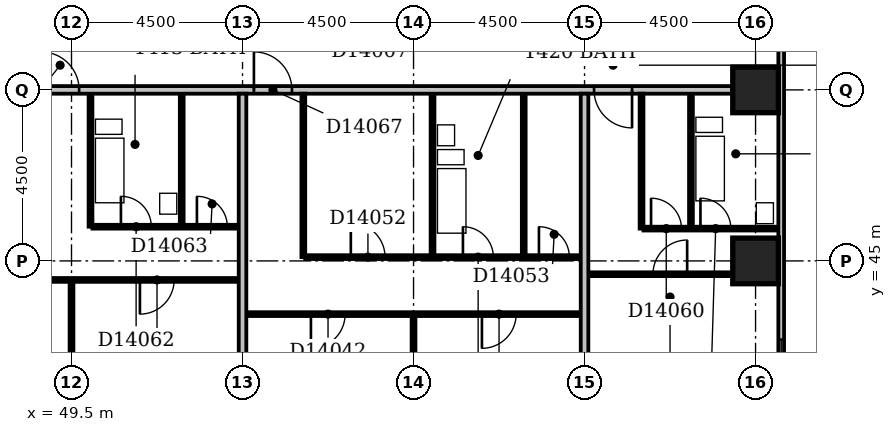
"""IFC4 building model, lengths in metres.
Left out: names, types, materials, properties, quantities, classifications, styles, units other than length and angle.
Written with IfcOpenShell. Run it as: python <this file> out.ifc"""

import sys

from ifc_helpers import new_model, si_unit, direction, frame, frame_2d, origin, origin_2d, place, context, subcontext, project, spatial, rectangle, extrude, element, fill, save


model = new_model("IFC4")
c1 = context("Model", 3, precision=1e-05, world=origin(), true_north=direction((0.0, 1.0)))
c2 = subcontext(c1, "Body", "Model", "MODEL_VIEW")
j1 = project(units=[si_unit("LENGTHUNIT", "METRE"), si_unit("PLANEANGLEUNIT", "RADIAN")], contexts=[c1])
p1 = place(None, origin())
s1 = spatial("IfcSite", under=j1, at=p1, CompositionType="ELEMENT")
p2 = place(p1, origin())
s2 = spatial("IfcBuilding", under=s1, at=p2, CompositionType="ELEMENT")
p3 = place(p2, frame((0.0, 0.0, 61.4)))
s3 = spatial("IfcBuildingStorey", under=s2, at=p3, CompositionType="ELEMENT", Elevation=61.4)
for number, where, z_axis, x_axis in (
    (1, (67.5, 45.0, -0.3), (0.0, 0.0, 1.0), (1.0, 0.0, 0.0)),
    (2, (67.5, 49.5, -0.3), (0.0, 0.0, 1.0), (1.0, 0.0, 0.0)),
):
    element("IfcColumn", number, at=place(p3, frame(where, z_axis=z_axis, x_axis=x_axis)), inside=s3, PredefinedType="COLUMN", context=c2, shape_type="SweptSolid", body=[
        extrude(rectangle(XDim=1.2, YDim=1.2, at=origin_2d()), origin(), (0.0, 0.0, 1.0), 3.6),
    ])
p4 = place(p3, frame((68.175, 35.4, 0.0), z_axis=(0.0, 0.0, 1.0), x_axis=(0.0, 1.0, 0.0)))
e3 = element("IfcWall", 3, at=p4, inside=s3, PredefinedType="STANDARD", context=c2, shape_type="SweptSolid", body=[
    extrude(rectangle(XDim=23.85, YDim=0.15, at=frame_2d((11.925, 0.0))), origin(), (0.0, 0.0, 1.0), 2.7),
])
p5 = place(p4, frame((1.65, 0.0, 0.6)))
e4 = element("IfcOpeningElement", 4, at=p5, cuts=e3, PredefinedType="OPENING", context=c2, shape_type="SweptSolid", body=[
    extrude(rectangle(XDim=2.4, YDim=1.8, at=frame_2d((1.2, 0.9))), frame((0.0, 0.087, 0.0), z_axis=(0.0, -1.0, 0.0), x_axis=(1.0, 0.0, 0.0)), (0.0, 0.0, 1.0), 0.174),
])
p6 = place(p4, frame((6.03, 0.0, 0.6)))
e5 = element("IfcOpeningElement", 5, at=p6, cuts=e3, PredefinedType="OPENING", context=c2, shape_type="SweptSolid", body=[
    extrude(rectangle(XDim=1.5, YDim=1.8, at=frame_2d((0.75, 0.9))), frame((0.0, 0.087, 0.0), z_axis=(0.0, -1.0, 0.0), x_axis=(1.0, 0.0, 0.0)), (0.0, 0.0, 1.0), 0.174),
])
p7 = place(p3, frame((49.5, 36.6, 0.0), z_axis=(0.0, 0.0, 1.0), x_axis=(0.0, 1.0, 0.0)))
e6 = element("IfcWall", 6, at=p7, inside=s3, PredefinedType="PARTITIONING", context=c2, shape_type="SweptSolid", body=[
    extrude(rectangle(XDim=7.85, YDim=0.1, at=frame_2d((3.925, 0.0))), origin(), (0.0, 0.0, 1.0), 3.3),
])
p8 = place(p3, frame((54.0, 36.6, 0.0), z_axis=(0.0, 0.0, 1.0), x_axis=(0.0, 1.0, 0.0)))
e7 = element("IfcWall", 7, at=p8, inside=s3, PredefinedType="PARTITIONING", context=c2, shape_type="SweptSolid", body=[
    extrude(rectangle(XDim=12.8, YDim=0.2, at=frame_2d((6.4, 0.0))), origin(), (0.0, 0.0, 1.0), 2.6),
])
p9 = place(p3, frame((58.5, 36.6, 0.0), z_axis=(0.0, 0.0, 1.0), x_axis=(0.0, 1.0, 0.0)))
e8 = element("IfcWall", 8, at=p9, inside=s3, PredefinedType="PARTITIONING", context=c2, shape_type="SweptSolid", body=[
    extrude(rectangle(XDim=6.95, YDim=0.1, at=frame_2d((3.475, 0.0))), origin(), (0.0, 0.0, 1.0), 3.3),
])
p10 = place(p3, frame((63.0, 36.6, 0.0), z_axis=(0.0, 0.0, 1.0), x_axis=(0.0, 1.0, 0.0)))
e9 = element("IfcWall", 9, at=p10, inside=s3, PredefinedType="PARTITIONING", context=c2, shape_type="SweptSolid", body=[
    extrude(rectangle(XDim=12.8, YDim=0.2, at=frame_2d((6.4, 0.0))), origin(), (0.0, 0.0, 1.0), 2.4),
])
p11 = place(p3, frame((54.1, 43.6, 0.0), z_axis=(0.0, 0.0, 1.0), x_axis=(1.0, 0.0, 0.0)))
e10 = element("IfcWall", 10, at=p11, inside=s3, PredefinedType="PARTITIONING", context=c2, shape_type="SweptSolid", body=[
    extrude(rectangle(XDim=8.8, YDim=0.1, at=frame_2d((4.4, 0.0))), origin(), (0.0, 0.0, 1.0), 3.3),
])
p12 = place(p11, frame((1.7, 0.0, 0.0)))
e11 = element("IfcOpeningElement", 11, at=p12, cuts=e10, PredefinedType="OPENING", context=c2, shape_type="SweptSolid", body=[
    extrude(rectangle(XDim=0.9, YDim=2.1, at=frame_2d((0.45, 1.05))), frame((0.0, 0.062, 0.0), z_axis=(0.0, -1.0, 0.0), x_axis=(1.0, 0.0, 0.0)), (0.0, 0.0, 1.0), 0.124),
])
p13 = place(p11, frame((6.2, 0.0, 0.0)))
e12 = element("IfcOpeningElement", 12, at=p13, cuts=e10, PredefinedType="OPENING", context=c2, shape_type="SweptSolid", body=[
    extrude(rectangle(XDim=0.9, YDim=2.1, at=frame_2d((0.45, 1.05))), frame((0.0, 0.062, 0.0), z_axis=(0.0, -1.0, 0.0), x_axis=(1.0, 0.0, 0.0)), (0.0, 0.0, 1.0), 0.124),
])
p14 = place(p3, frame((40.6, 44.5, 0.0), z_axis=(0.0, 0.0, 1.0), x_axis=(1.0, 0.0, 0.0)))
e13 = element("IfcWall", 13, at=p14, inside=s3, PredefinedType="PARTITIONING", context=c2, shape_type="SweptSolid", body=[
    extrude(rectangle(XDim=13.3, YDim=0.1, at=frame_2d((6.65, 0.0))), origin(), (0.0, 0.0, 1.0), 3.3),
])
p15 = place(p14, frame((1.7, 0.0, 0.0)))
e14 = element("IfcOpeningElement", 14, at=p15, cuts=e13, PredefinedType="OPENING", context=c2, shape_type="SweptSolid", body=[
    extrude(rectangle(XDim=0.9, YDim=2.1, at=frame_2d((0.45, 1.05))), frame((0.0, 0.062, 0.0), z_axis=(0.0, -1.0, 0.0), x_axis=(1.0, 0.0, 0.0)), (0.0, 0.0, 1.0), 0.124),
])
p16 = place(p14, frame((6.2, 0.0, 0.0)))
e15 = element("IfcOpeningElement", 15, at=p16, cuts=e13, PredefinedType="OPENING", context=c2, shape_type="SweptSolid", body=[
    extrude(rectangle(XDim=0.9, YDim=2.1, at=frame_2d((0.45, 1.05))), frame((0.0, 0.062, 0.0), z_axis=(0.0, -1.0, 0.0), x_axis=(1.0, 0.0, 0.0)), (0.0, 0.0, 1.0), 0.124),
])
p17 = place(p14, frame((10.7, 0.0, 0.0)))
e16 = element("IfcOpeningElement", 16, at=p17, cuts=e13, PredefinedType="OPENING", context=c2, shape_type="SweptSolid", body=[
    extrude(rectangle(XDim=0.9, YDim=2.1, at=frame_2d((0.45, 1.05))), frame((0.0, 0.062, 0.0), z_axis=(0.0, -1.0, 0.0), x_axis=(1.0, 0.0, 0.0)), (0.0, 0.0, 1.0), 0.124),
])
p18 = place(p3, frame((63.1, 44.65, 0.0), z_axis=(0.0, 0.0, 1.0), x_axis=(1.0, 0.0, 0.0)))
e17 = element("IfcWall", 17, at=p18, inside=s3, PredefinedType="PARTITIONING", context=c2, shape_type="SweptSolid", body=[
    extrude(rectangle(XDim=3.8, YDim=0.1, at=frame_2d((1.9, 0.0))), origin(), (0.0, 0.0, 1.0), 3.3),
])
p19 = place(p18, frame((1.7, 0.0, 0.0)))
e18 = element("IfcOpeningElement", 18, at=p19, cuts=e17, PredefinedType="OPENING", context=c2, shape_type="SweptSolid", body=[
    extrude(rectangle(XDim=0.9, YDim=2.1, at=frame_2d((0.45, 1.05))), frame((0.0, 0.062, 0.0), z_axis=(0.0, -1.0, 0.0), x_axis=(1.0, 0.0, 0.0)), (0.0, 0.0, 1.0), 0.124),
])
p20 = place(p3, frame((55.6, 45.1, 0.0), z_axis=(0.0, 0.0, 1.0), x_axis=(0.0, 1.0, 0.0)))
e19 = element("IfcWall", 19, at=p20, inside=s3, PredefinedType="PARTITIONING", context=c2, shape_type="SweptSolid", body=[
    extrude(rectangle(XDim=4.3, YDim=0.1, at=frame_2d((2.15, 0.0))), origin(), (0.0, 0.0, 1.0), 3.3),
])
p21 = place(p3, frame((55.65, 45.1, 0.0), z_axis=(0.0, 0.0, 1.0), x_axis=(1.0, 0.0, 0.0)))
e20 = element("IfcWall", 20, at=p21, inside=s3, PredefinedType="PARTITIONING", context=c2, shape_type="SweptSolid", body=[
    extrude(rectangle(XDim=7.25, YDim=0.1, at=frame_2d((3.625, 0.0))), origin(), (0.0, 0.0, 1.0), 3.3),
])
p22 = place(p21, frame((4.15, 0.0, 0.0)))
e21 = element("IfcOpeningElement", 21, at=p22, cuts=e20, PredefinedType="OPENING", context=c2, shape_type="SweptSolid", body=[
    extrude(rectangle(XDim=0.8, YDim=2.1, at=frame_2d((0.4, 1.05))), frame((0.0, 0.062, 0.0), z_axis=(0.0, -1.0, 0.0), x_axis=(1.0, 0.0, 0.0)), (0.0, 0.0, 1.0), 0.124),
])
p23 = place(p21, frame((1.2, 0.0, 0.0)))
e22 = element("IfcOpeningElement", 22, at=p23, cuts=e20, PredefinedType="OPENING", context=c2, shape_type="SweptSolid", body=[
    extrude(rectangle(XDim=0.9, YDim=2.1, at=frame_2d((0.45, 1.05))), frame((0.0, 0.062, 0.0), z_axis=(0.0, -1.0, 0.0), x_axis=(1.0, 0.0, 0.0)), (0.0, 0.0, 1.0), 0.124),
])
p24 = place(p21, frame((6.15, 0.0, 0.0)))
e23 = element("IfcOpeningElement", 23, at=p24, cuts=e20, PredefinedType="OPENING", context=c2, shape_type="SweptSolid", body=[
    extrude(rectangle(XDim=0.8, YDim=2.1, at=frame_2d((0.4, 1.05))), frame((0.0, 0.062, 0.0), z_axis=(0.0, -1.0, 0.0), x_axis=(1.0, 0.0, 0.0)), (0.0, 0.0, 1.0), 0.124),
])
for number, where, z_axis, x_axis in (
    (24, (59.0, 45.15, 0.0), (0.0, 0.0, 1.0), (0.0, 1.0, 0.0)),
    (25, (61.4, 45.15, 0.0), (0.0, 0.0, 1.0), (0.0, 1.0, 0.0)),
):
    element("IfcWall", number, at=place(p3, frame(where, z_axis=z_axis, x_axis=x_axis)), inside=s3, PredefinedType="PLUMBINGWALL", context=c2, shape_type="SweptSolid", body=[
        extrude(rectangle(XDim=4.25, YDim=0.1, at=frame_2d((2.125, 0.0))), origin(), (0.0, 0.0, 1.0), 3.3),
    ])
p25 = place(p3, frame((64.5, 45.85, 0.0), z_axis=(0.0, 0.0, 1.0), x_axis=(0.0, 1.0, 0.0)))
e26 = element("IfcWall", 26, at=p25, inside=s3, PredefinedType="PARTITIONING", context=c2, shape_type="SweptSolid", body=[
    extrude(rectangle(XDim=3.55, YDim=0.1, at=frame_2d((1.775, 0.0))), origin(), (0.0, 0.0, 1.0), 3.3),
])
p26 = place(p3, frame((64.55, 45.85, 0.0), z_axis=(0.0, 0.0, 1.0), x_axis=(1.0, 0.0, 0.0)))
e27 = element("IfcWall", 27, at=p26, inside=s3, PredefinedType="PARTITIONING", context=c2, shape_type="SweptSolid", body=[
    extrude(rectangle(XDim=3.55, YDim=0.1, at=frame_2d((1.775, 0.0))), origin(), (0.0, 0.0, 1.0), 3.3),
])
p27 = place(p26, frame((1.5, 0.0, 0.0)))
e28 = element("IfcOpeningElement", 28, at=p27, cuts=e27, PredefinedType="OPENING", context=c2, shape_type="SweptSolid", body=[
    extrude(rectangle(XDim=0.8, YDim=2.1, at=frame_2d((0.4, 1.05))), frame((0.0, 0.062, 0.0), z_axis=(0.0, -1.0, 0.0), x_axis=(1.0, 0.0, 0.0)), (0.0, 0.0, 1.0), 0.124),
])
p28 = place(p26, frame((0.2, 0.0, 0.0)))
e29 = element("IfcOpeningElement", 29, at=p28, cuts=e27, PredefinedType="OPENING", context=c2, shape_type="SweptSolid", body=[
    extrude(rectangle(XDim=0.8, YDim=2.1, at=frame_2d((0.4, 1.05))), frame((0.0, 0.062, 0.0), z_axis=(0.0, -1.0, 0.0), x_axis=(1.0, 0.0, 0.0)), (0.0, 0.0, 1.0), 0.124),
])
p29 = place(p3, frame((50.0, 45.9, 0.0), z_axis=(0.0, 0.0, 1.0), x_axis=(0.0, 1.0, 0.0)))
e30 = element("IfcWall", 30, at=p29, inside=s3, PredefinedType="PLUMBINGWALL", context=c2, shape_type="SweptSolid", body=[
    extrude(rectangle(XDim=3.5, YDim=0.1, at=frame_2d((1.75, 0.0))), origin(), (0.0, 0.0, 1.0), 3.3),
])
p30 = place(p3, frame((50.05, 45.9, 0.0), z_axis=(0.0, 0.0, 1.0), x_axis=(1.0, 0.0, 0.0)))
e31 = element("IfcWall", 31, at=p30, inside=s3, PredefinedType="PARTITIONING", context=c2, shape_type="SweptSolid", body=[
    extrude(rectangle(XDim=3.85, YDim=0.1, at=frame_2d((1.925, 0.0))), origin(), (0.0, 0.0, 1.0), 3.3),
])
p31 = place(p30, frame((0.75, 0.0, 0.0)))
e32 = element("IfcOpeningElement", 32, at=p31, cuts=e31, PredefinedType="OPENING", context=c2, shape_type="SweptSolid", body=[
    extrude(rectangle(XDim=0.8, YDim=2.1, at=frame_2d((0.4, 1.05))), frame((0.0, 0.062, 0.0), z_axis=(0.0, -1.0, 0.0), x_axis=(1.0, 0.0, 0.0)), (0.0, 0.0, 1.0), 0.124),
])
p32 = place(p30, frame((2.75, 0.0, 0.0)))
e33 = element("IfcOpeningElement", 33, at=p32, cuts=e31, PredefinedType="OPENING", context=c2, shape_type="SweptSolid", body=[
    extrude(rectangle(XDim=0.8, YDim=2.1, at=frame_2d((0.4, 1.05))), frame((0.0, 0.062, 0.0), z_axis=(0.0, -1.0, 0.0), x_axis=(1.0, 0.0, 0.0)), (0.0, 0.0, 1.0), 0.124),
])
p33 = place(p3, frame((65.8, 45.9, 0.0), z_axis=(0.0, 0.0, 1.0), x_axis=(0.0, 1.0, 0.0)))
e34 = element("IfcWall", 34, at=p33, inside=s3, PredefinedType="PLUMBINGWALL", context=c2, shape_type="SweptSolid", body=[
    extrude(rectangle(XDim=3.5, YDim=0.1, at=frame_2d((1.75, 0.0))), origin(), (0.0, 0.0, 1.0), 3.3),
])
p34 = place(p3, frame((52.4, 45.95, 0.0), z_axis=(0.0, 0.0, 1.0), x_axis=(0.0, 1.0, 0.0)))
e35 = element("IfcWall", 35, at=p34, inside=s3, PredefinedType="PLUMBINGWALL", context=c2, shape_type="SweptSolid", body=[
    extrude(rectangle(XDim=3.45, YDim=0.1, at=frame_2d((1.725, 0.0))), origin(), (0.0, 0.0, 1.0), 3.3),
])
p35 = place(p3, frame((9.1, 49.5, 0.0), z_axis=(0.0, 0.0, 1.0), x_axis=(1.0, 0.0, 0.0)))
e36 = element("IfcWall", 36, at=p35, inside=s3, PredefinedType="PARTITIONING", context=c2, shape_type="SweptSolid", body=[
    extrude(rectangle(XDim=57.8, YDim=0.2, at=frame_2d((28.9, 0.0))), origin(), (0.0, 0.0, 1.0), 3.3),
])
p36 = place(p35, frame((15.35, 0.0, 0.0)))
e37 = element("IfcOpeningElement", 37, at=p36, cuts=e36, PredefinedType="OPENING", context=c2, shape_type="SweptSolid", body=[
    extrude(rectangle(XDim=1.0, YDim=2.1, at=frame_2d((0.5, 1.05))), frame((0.0, 0.112, 0.0), z_axis=(0.0, -1.0, 0.0), x_axis=(1.0, 0.0, 0.0)), (0.0, 0.0, 1.0), 0.224),
])
p37 = place(p35, frame((18.2, 0.0, 0.0)))
e38 = element("IfcOpeningElement", 38, at=p37, cuts=e36, PredefinedType="OPENING", context=c2, shape_type="SweptSolid", body=[
    extrude(rectangle(XDim=1.0, YDim=2.1, at=frame_2d((0.5, 1.05))), frame((0.0, 0.112, 0.0), z_axis=(0.0, -1.0, 0.0), x_axis=(1.0, 0.0, 0.0)), (0.0, 0.0, 1.0), 0.224),
])
p38 = place(p35, frame((39.6, 0.0, 0.0)))
e39 = element("IfcOpeningElement", 39, at=p38, cuts=e36, PredefinedType="OPENING", context=c2, shape_type="SweptSolid", body=[
    extrude(rectangle(XDim=1.0, YDim=2.1, at=frame_2d((0.5, 1.05))), frame((0.0, 0.112, 0.0), z_axis=(0.0, -1.0, 0.0), x_axis=(1.0, 0.0, 0.0)), (0.0, 0.0, 1.0), 0.224),
])
p39 = place(p35, frame((45.2, 0.0, 0.0)))
e40 = element("IfcOpeningElement", 40, at=p39, cuts=e36, PredefinedType="OPENING", context=c2, shape_type="SweptSolid", body=[
    extrude(rectangle(XDim=1.0, YDim=2.1, at=frame_2d((0.5, 1.05))), frame((0.0, 0.112, 0.0), z_axis=(0.0, -1.0, 0.0), x_axis=(1.0, 0.0, 0.0)), (0.0, 0.0, 1.0), 0.224),
])
p40 = place(p35, frame((54.15, 0.0, 0.0)))
e41 = element("IfcOpeningElement", 41, at=p40, cuts=e36, PredefinedType="OPENING", context=c2, shape_type="SweptSolid", body=[
    extrude(rectangle(XDim=1.0, YDim=2.1, at=frame_2d((0.5, 1.05))), frame((0.0, 0.112, 0.0), z_axis=(0.0, -1.0, 0.0), x_axis=(1.0, 0.0, 0.0)), (0.0, 0.0, 1.0), 0.224),
])
p41 = place(p35, frame((6.15, 0.0, 0.0)))
e42 = element("IfcOpeningElement", 42, at=p41, cuts=e36, PredefinedType="OPENING", context=c2, shape_type="SweptSolid", body=[
    extrude(rectangle(XDim=0.9, YDim=2.1, at=frame_2d((0.45, 1.05))), frame((0.0, 0.112, 0.0), z_axis=(0.0, -1.0, 0.0), x_axis=(1.0, 0.0, 0.0)), (0.0, 0.0, 1.0), 0.224),
])
p42 = place(p6, origin())
e43 = element("IfcWindow", 43, at=p42, inside=s3, PartitioningType="SINGLE_PANEL", PredefinedType="WINDOW", context=c2, shape_type="SweptSolid", body=[
    extrude(rectangle(XDim=1.5, YDim=1.8, at=frame_2d((0.75, 0.9))), frame((0.0, 0.03, 0.0), z_axis=(0.0, -1.0, 0.0), x_axis=(1.0, 0.0, 0.0)), (0.0, 0.0, 1.0), 0.06),
])
fill(e5, e43)
p43 = place(p12, frame((0.9, 0.0, 0.0), z_axis=(0.0, 0.0, 1.0), x_axis=(-1.0, 0.0, 0.0)))
e44 = element("IfcDoor", 44, at=p43, inside=s3, OperationType="SINGLE_SWING_RIGHT", PredefinedType="DOOR", context=c2, shape_type="SweptSolid", body=[
    extrude(rectangle(XDim=0.9, YDim=2.1, at=frame_2d((0.45, 1.05))), frame((0.0, 0.025, 0.0), z_axis=(0.0, -1.0, 0.0), x_axis=(1.0, 0.0, 0.0)), (0.0, 0.0, 1.0), 0.05),
])
fill(e11, e44)
p44 = place(p13, frame((0.9, 0.0, 0.0), z_axis=(0.0, 0.0, 1.0), x_axis=(-1.0, 0.0, 0.0)))
e45 = element("IfcDoor", 45, at=p44, inside=s3, OperationType="SINGLE_SWING_RIGHT", PredefinedType="DOOR", context=c2, shape_type="SweptSolid", body=[
    extrude(rectangle(XDim=0.9, YDim=2.1, at=frame_2d((0.45, 1.05))), frame((0.0, 0.025, 0.0), z_axis=(0.0, -1.0, 0.0), x_axis=(1.0, 0.0, 0.0)), (0.0, 0.0, 1.0), 0.05),
])
fill(e12, e45)
p45 = place(p17, frame((0.9, 0.0, 0.0), z_axis=(0.0, 0.0, 1.0), x_axis=(-1.0, 0.0, 0.0)))
e46 = element("IfcDoor", 46, at=p45, inside=s3, OperationType="SINGLE_SWING_RIGHT", PredefinedType="DOOR", context=c2, shape_type="SweptSolid", body=[
    extrude(rectangle(XDim=0.9, YDim=2.1, at=frame_2d((0.45, 1.05))), frame((0.0, 0.025, 0.0), z_axis=(0.0, -1.0, 0.0), x_axis=(1.0, 0.0, 0.0)), (0.0, 0.0, 1.0), 0.05),
])
fill(e16, e46)
p46 = place(p19, frame((0.9, 0.0, 0.0), z_axis=(0.0, 0.0, 1.0), x_axis=(-1.0, 0.0, 0.0)))
e47 = element("IfcDoor", 47, at=p46, inside=s3, OperationType="SINGLE_SWING_LEFT", PredefinedType="DOOR", context=c2, shape_type="SweptSolid", body=[
    extrude(rectangle(XDim=0.9, YDim=2.1, at=frame_2d((0.45, 1.05))), frame((0.0, 0.025, 0.0), z_axis=(0.0, -1.0, 0.0), x_axis=(1.0, 0.0, 0.0)), (0.0, 0.0, 1.0), 0.05),
])
fill(e18, e47)
p47 = place(p22, origin())
e48 = element("IfcDoor", 48, at=p47, inside=s3, OperationType="SINGLE_SWING_LEFT", PredefinedType="DOOR", context=c2, shape_type="SweptSolid", body=[
    extrude(rectangle(XDim=0.8, YDim=2.1, at=frame_2d((0.4, 1.05))), frame((0.0, 0.025, 0.0), z_axis=(0.0, -1.0, 0.0), x_axis=(1.0, 0.0, 0.0)), (0.0, 0.0, 1.0), 0.05),
])
fill(e21, e48)
p48 = place(p23, origin())
e49 = element("IfcDoor", 49, at=p48, inside=s3, OperationType="SINGLE_SWING_LEFT", PredefinedType="DOOR", context=c2, shape_type="SweptSolid", body=[
    extrude(rectangle(XDim=0.9, YDim=2.1, at=frame_2d((0.45, 1.05))), frame((0.0, 0.025, 0.0), z_axis=(0.0, -1.0, 0.0), x_axis=(1.0, 0.0, 0.0)), (0.0, 0.0, 1.0), 0.05),
])
fill(e22, e49)
p49 = place(p24, origin())
e50 = element("IfcDoor", 50, at=p49, inside=s3, OperationType="SINGLE_SWING_LEFT", PredefinedType="DOOR", context=c2, shape_type="SweptSolid", body=[
    extrude(rectangle(XDim=0.8, YDim=2.1, at=frame_2d((0.4, 1.05))), frame((0.0, 0.025, 0.0), z_axis=(0.0, -1.0, 0.0), x_axis=(1.0, 0.0, 0.0)), (0.0, 0.0, 1.0), 0.05),
])
fill(e23, e50)
p50 = place(p27, origin())
e51 = element("IfcDoor", 51, at=p50, inside=s3, OperationType="SINGLE_SWING_LEFT", PredefinedType="DOOR", context=c2, shape_type="SweptSolid", body=[
    extrude(rectangle(XDim=0.8, YDim=2.1, at=frame_2d((0.4, 1.05))), frame((0.0, 0.025, 0.0), z_axis=(0.0, -1.0, 0.0), x_axis=(1.0, 0.0, 0.0)), (0.0, 0.0, 1.0), 0.05),
])
fill(e28, e51)
p51 = place(p28, origin())
e52 = element("IfcDoor", 52, at=p51, inside=s3, OperationType="SINGLE_SWING_LEFT", PredefinedType="DOOR", context=c2, shape_type="SweptSolid", body=[
    extrude(rectangle(XDim=0.8, YDim=2.1, at=frame_2d((0.4, 1.05))), frame((0.0, 0.025, 0.0), z_axis=(0.0, -1.0, 0.0), x_axis=(1.0, 0.0, 0.0)), (0.0, 0.0, 1.0), 0.05),
])
fill(e29, e52)
p52 = place(p31, origin())
e53 = element("IfcDoor", 53, at=p52, inside=s3, OperationType="SINGLE_SWING_LEFT", PredefinedType="DOOR", context=c2, shape_type="SweptSolid", body=[
    extrude(rectangle(XDim=0.8, YDim=2.1, at=frame_2d((0.4, 1.05))), frame((0.0, 0.025, 0.0), z_axis=(0.0, -1.0, 0.0), x_axis=(1.0, 0.0, 0.0)), (0.0, 0.0, 1.0), 0.05),
])
fill(e32, e53)
p53 = place(p32, origin())
e54 = element("IfcDoor", 54, at=p53, inside=s3, OperationType="SINGLE_SWING_LEFT", PredefinedType="DOOR", context=c2, shape_type="SweptSolid", body=[
    extrude(rectangle(XDim=0.8, YDim=2.1, at=frame_2d((0.4, 1.05))), frame((0.0, 0.025, 0.0), z_axis=(0.0, -1.0, 0.0), x_axis=(1.0, 0.0, 0.0)), (0.0, 0.0, 1.0), 0.05),
])
fill(e33, e54)
p54 = place(p38, origin())
e55 = element("IfcDoor", 55, at=p54, inside=s3, OperationType="SINGLE_SWING_LEFT", PredefinedType="DOOR", context=c2, shape_type="SweptSolid", body=[
    extrude(rectangle(XDim=1.0, YDim=2.1, at=frame_2d((0.5, 1.05))), frame((0.0, 0.025, 0.0), z_axis=(0.0, -1.0, 0.0), x_axis=(1.0, 0.0, 0.0)), (0.0, 0.0, 1.0), 0.05),
])
fill(e39, e55)
p55 = place(p39, origin())
e56 = element("IfcDoor", 56, at=p55, inside=s3, OperationType="SINGLE_SWING_LEFT", PredefinedType="DOOR", context=c2, shape_type="SweptSolid", body=[
    extrude(rectangle(XDim=1.0, YDim=2.1, at=frame_2d((0.5, 1.05))), frame((0.0, 0.025, 0.0), z_axis=(0.0, -1.0, 0.0), x_axis=(1.0, 0.0, 0.0)), (0.0, 0.0, 1.0), 0.05),
])
fill(e40, e56)
p56 = place(p40, origin())
e57 = element("IfcDoor", 57, at=p56, inside=s3, OperationType="SINGLE_SWING_RIGHT", PredefinedType="DOOR", context=c2, shape_type="SweptSolid", body=[
    extrude(rectangle(XDim=1.0, YDim=2.1, at=frame_2d((0.5, 1.05))), frame((0.0, 0.025, 0.0), z_axis=(0.0, -1.0, 0.0), x_axis=(1.0, 0.0, 0.0)), (0.0, 0.0, 1.0), 0.05),
])
fill(e41, e57)
save(model, sys.argv[1])
